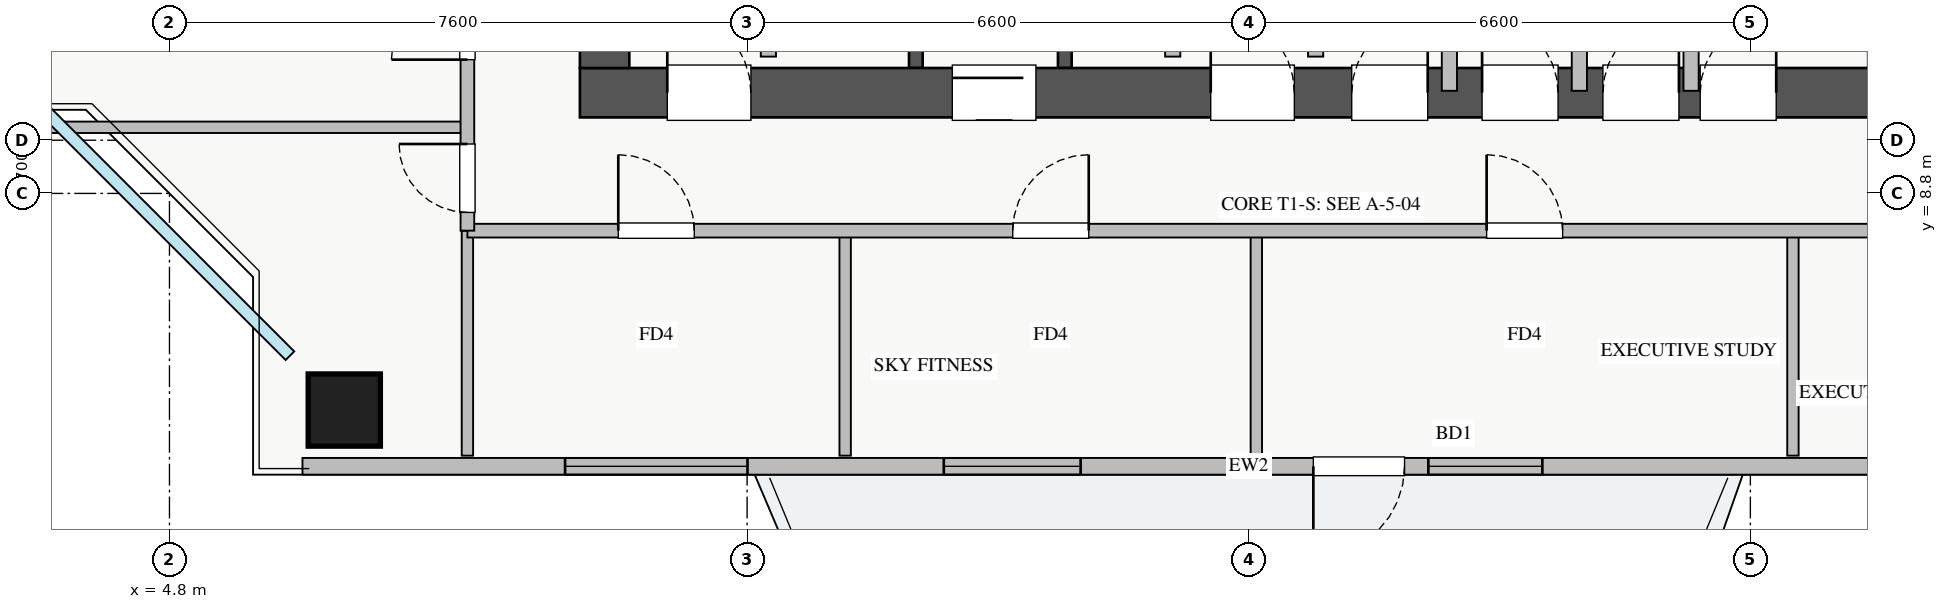
"""IFC4 building model, lengths in metres.
Left out: names, types, materials, properties, quantities, classifications, styles, units other than length and angle.
Written with IfcOpenShell. Run it as: python <this file> out.ifc"""

import sys

from ifc_helpers import new_model, si_unit, direction, frame, frame_2d, origin, origin_2d, place, context, subcontext, project, spatial, rectangle, extrude, source, transform, mapped, element, fill, save


model = new_model("IFC4")
c1 = context("Model", 3, precision=1e-05, world=origin(), true_north=direction((0.0, 1.0)))
c2 = subcontext(c1, "Body", "Model", "MODEL_VIEW")
j1 = project(units=[si_unit("LENGTHUNIT", "METRE"), si_unit("PLANEANGLEUNIT", "RADIAN")], contexts=[c1])
p1 = place(None, origin())
s1 = spatial("IfcSite", under=j1, at=p1, CompositionType="ELEMENT")
p2 = place(p1, origin())
s2 = spatial("IfcBuilding", under=s1, at=p2, CompositionType="ELEMENT")
p3 = place(p2, frame((0.0, 0.0, 182.75)))
s3 = spatial("IfcBuildingStorey", under=s2, at=p3, CompositionType="ELEMENT", Elevation=182.75)
for number, where, z_axis, x_axis in (
    (1, (14.62, 10.45, 0.0), (0.0, 0.0, 1.0), (0.0, 1.0, 0.0)),
    (2, (16.58, 10.45, 0.0), (0.0, 0.0, 1.0), (0.0, 1.0, 0.0)),
):
    element("IfcWall", number, at=place(p3, frame(where, z_axis=z_axis, x_axis=x_axis)), inside=s3, PredefinedType="SHEAR", context=c2, shape_type="SweptSolid", body=[
        extrude(rectangle(XDim=2.35, YDim=0.18, at=frame_2d((1.175, 0.0))), origin(), (0.0, 0.0, 1.0), 3.03),
    ])
p4 = place(p3, frame((10.2, 10.125, 0.0), z_axis=(0.0, 0.0, 1.0), x_axis=(1.0, 0.0, 0.0)))
e3 = element("IfcWall", 3, at=p4, inside=s3, PredefinedType="SHEAR", context=c2, shape_type="SweptSolid", body=[
    extrude(rectangle(XDim=17.6, YDim=0.65, at=frame_2d((8.8, 0.0))), origin(), (0.0, 0.0, 1.0), 3.25),
])
p5 = place(p4, frame((1.15, 0.0, 0.0)))
e4 = element("IfcOpeningElement", 4, at=p5, cuts=e3, PredefinedType="OPENING", context=c2, shape_type="SweptSolid", body=[
    extrude(rectangle(XDim=1.1, YDim=2.05, at=frame_2d((0.55, 1.025))), frame((0.0, 0.335, 0.0), z_axis=(0.0, -1.0, 0.0), x_axis=(1.0, 0.0, 0.0)), (0.0, 0.0, 1.0), 0.67),
])
p6 = place(p4, frame((8.3, 0.0, 0.0)))
e5 = element("IfcOpeningElement", 5, at=p6, cuts=e3, PredefinedType="OPENING", context=c2, shape_type="SweptSolid", body=[
    extrude(rectangle(XDim=1.1, YDim=2.05, at=frame_2d((0.55, 1.025))), frame((0.0, 0.335, 0.0), z_axis=(0.0, -1.0, 0.0), x_axis=(1.0, 0.0, 0.0)), (0.0, 0.0, 1.0), 0.67),
])
p7 = place(p4, frame((4.9, 0.0, 0.0)))
e6 = element("IfcOpeningElement", 6, at=p7, cuts=e3, PredefinedType="OPENING", context=c2, shape_type="SweptSolid", body=[
    extrude(rectangle(XDim=1.1, YDim=2.05, at=frame_2d((0.55, 1.025))), frame((0.0, 0.335, 0.0), z_axis=(0.0, -1.0, 0.0), x_axis=(1.0, 0.0, 0.0)), (0.0, 0.0, 1.0), 0.67),
])
p8 = place(p4, frame((14.74, 0.0, 0.0)))
e7 = element("IfcOpeningElement", 7, at=p8, cuts=e3, PredefinedType="OPENING", context=c2, shape_type="SweptSolid", body=[
    extrude(rectangle(XDim=1.0, YDim=2.05, at=frame_2d((0.5, 1.025))), frame((0.0, 0.335, 0.0), z_axis=(0.0, -1.0, 0.0), x_axis=(1.0, 0.0, 0.0)), (0.0, 0.0, 1.0), 0.67),
])
p9 = place(p4, frame((10.155, 0.0, 0.0)))
e8 = element("IfcOpeningElement", 8, at=p9, cuts=e3, PredefinedType="OPENING", context=c2, shape_type="SweptSolid", body=[
    extrude(rectangle(XDim=1.0, YDim=2.05, at=frame_2d((0.5, 1.025))), frame((0.0, 0.335, 0.0), z_axis=(0.0, -1.0, 0.0), x_axis=(1.0, 0.0, 0.0)), (0.0, 0.0, 1.0), 0.67),
])
p10 = place(p4, frame((11.87, 0.0, 0.0)))
e9 = element("IfcOpeningElement", 9, at=p10, cuts=e3, PredefinedType="OPENING", context=c2, shape_type="SweptSolid", body=[
    extrude(rectangle(XDim=1.0, YDim=2.05, at=frame_2d((0.5, 1.025))), frame((0.0, 0.335, 0.0), z_axis=(0.0, -1.0, 0.0), x_axis=(1.0, 0.0, 0.0)), (0.0, 0.0, 1.0), 0.67),
])
p11 = place(p4, frame((13.46, 0.0, 0.0)))
e10 = element("IfcOpeningElement", 10, at=p11, cuts=e3, PredefinedType="OPENING", context=c2, shape_type="SweptSolid", body=[
    extrude(rectangle(XDim=1.0, YDim=2.05, at=frame_2d((0.5, 1.025))), frame((0.0, 0.335, 0.0), z_axis=(0.0, -1.0, 0.0), x_axis=(1.0, 0.0, 0.0)), (0.0, 0.0, 1.0), 0.67),
])
p12 = place(p3, frame((10.525, 10.45, 0.0), z_axis=(0.0, 0.0, 1.0), x_axis=(0.0, 1.0, 0.0)))
e11 = element("IfcWall", 11, at=p12, inside=s3, PredefinedType="SHEAR", context=c2, shape_type="SweptSolid", body=[
    extrude(rectangle(XDim=5.9, YDim=0.65, at=frame_2d((2.95, 0.0))), origin(), (0.0, 0.0, 1.0), 3.25),
])
m1 = source(origin(), c2, "Body", "SweptSolid", [
    extrude(rectangle(XDim=0.95, YDim=0.95, at=origin_2d()), origin(), (0.0, 0.0, 1.0), 3.25),
])
p13 = place(p3, frame((7.1, 5.95, 0.0), z_axis=(0.0, 0.0, 1.0), x_axis=(1.0, 0.0, 0.0)))
e12 = element("IfcColumn", 12, at=p13, inside=s3, PredefinedType="COLUMN", context=c2, shape_type="MappedRepresentation", body=[
    mapped(m1, transform((0.0, 0.0, 0.0), x_axis=(1.0, 0.0, 0.0), y_axis=(0.0, 1.0, 0.0), z_axis=(0.0, 0.0, 1.0), scale=1.0)),
])
p14 = place(p3, frame((6.55, 5.21, 0.0), z_axis=(0.0, 0.0, 1.0), x_axis=(1.0, 0.0, 0.0)))
e13 = element("IfcWall", 13, at=p14, inside=s3, PredefinedType="STANDARD", context=c2, shape_type="SweptSolid", body=[
    extrude(rectangle(XDim=24.9, YDim=0.22, at=frame_2d((12.45, 0.0))), origin(), (0.0, 0.0, 1.0), 2.57),
])
p15 = place(p14, frame((13.3, 0.0, 0.0)))
e14 = element("IfcOpeningElement", 14, at=p15, cuts=e13, PredefinedType="OPENING", context=c2, shape_type="SweptSolid", body=[
    extrude(rectangle(XDim=1.2, YDim=2.1, at=frame_2d((0.6, 1.05))), frame((0.0, 0.12, 0.0), z_axis=(0.0, -1.0, 0.0), x_axis=(1.0, 0.0, 0.0)), (0.0, 0.0, 1.0), 0.24),
])
p16 = place(p14, frame((3.455, 0.0, 0.9)))
e15 = element("IfcOpeningElement", 15, at=p16, cuts=e13, PredefinedType="OPENING", context=c2, shape_type="SweptSolid", body=[
    extrude(rectangle(XDim=2.4, YDim=1.5, at=frame_2d((1.2, 0.75))), frame((0.0, 0.12, 0.0), z_axis=(0.0, -1.0, 0.0), x_axis=(1.0, 0.0, 0.0)), (0.0, 0.0, 1.0), 0.24),
])
p17 = place(p14, frame((8.438, 0.0, 0.9)))
e16 = element("IfcOpeningElement", 16, at=p17, cuts=e13, PredefinedType="OPENING", context=c2, shape_type="SweptSolid", body=[
    extrude(rectangle(XDim=1.8, YDim=1.45, at=frame_2d((0.9, 0.725))), frame((0.0, 0.12, 0.0), z_axis=(0.0, -1.0, 0.0), x_axis=(1.0, 0.0, 0.0)), (0.0, 0.0, 1.0), 0.24),
])
p18 = place(p14, frame((14.813, 0.0, 0.9)))
e17 = element("IfcOpeningElement", 17, at=p18, cuts=e13, PredefinedType="OPENING", context=c2, shape_type="SweptSolid", body=[
    extrude(rectangle(XDim=1.5, YDim=1.45, at=frame_2d((0.75, 0.725))), frame((0.0, 0.12, 0.0), z_axis=(0.0, -1.0, 0.0), x_axis=(1.0, 0.0, 0.0)), (0.0, 0.0, 1.0), 0.24),
])
p19 = place(p14, frame((20.738, 0.0, 0.9)))
e18 = element("IfcOpeningElement", 18, at=p19, cuts=e13, PredefinedType="OPENING", context=c2, shape_type="SweptSolid", body=[
    extrude(rectangle(XDim=2.1, YDim=1.48, at=frame_2d((1.05, 0.74))), frame((0.0, 0.12, 0.0), z_axis=(0.0, -1.0, 0.0), x_axis=(1.0, 0.0, 0.0)), (0.0, 0.0, 1.0), 0.24),
])
for number, where, z_axis, x_axis in (
    (19, (12.68, 10.6, 0.0), (0.0, 0.0, 1.0), (0.0, 1.0, 0.0)),
    (20, (18.0, 10.6, 0.0), (0.0, 0.0, 1.0), (0.0, 1.0, 0.0)),
    (21, (19.88, 10.6, 0.0), (0.0, 0.0, 1.0), (0.0, 1.0, 0.0)),
):
    element("IfcWall", number, at=place(p3, frame(where, z_axis=z_axis, x_axis=x_axis)), inside=s3, PredefinedType="PARTITIONING", context=c2, shape_type="SweptSolid", body=[
        extrude(rectangle(XDim=2.21, YDim=0.2, at=frame_2d((1.105, 0.0))), origin(), (0.0, 0.0, 1.0), 3.03),
    ])
for number, where, z_axis, x_axis in (
    (22, (24.82, 10.15, 0.0), (0.0, 0.0, 1.0), (0.0, 1.0, 0.0)),
    (23, (21.64, 10.15, 0.0), (0.0, 0.0, 1.0), (0.0, 1.0, 0.0)),
    (24, (23.35, 10.15, 0.0), (0.0, 0.0, 1.0), (0.0, 1.0, 0.0)),
):
    element("IfcWall", number, at=place(p3, frame(where, z_axis=z_axis, x_axis=x_axis)), inside=s3, PredefinedType="PARTITIONING", context=c2, shape_type="SweptSolid", body=[
        extrude(rectangle(XDim=2.65, YDim=0.2, at=frame_2d((1.325, 0.0))), origin(), (0.0, 0.0, 1.0), 3.03),
    ])
p20 = place(p3, frame((13.69, 5.35, 0.0), z_axis=(0.0, 0.0, 1.0), x_axis=(0.0, 1.0, 0.0)))
e25 = element("IfcWall", 25, at=p20, inside=s3, PredefinedType="PARTITIONING", context=c2, shape_type="SweptSolid", body=[
    extrude(rectangle(XDim=2.96, YDim=0.15, at=frame_2d((1.48, 0.0))), origin(), (0.0, 0.0, 1.0), 3.03),
])
p21 = place(p3, frame((19.1, 5.35, 0.0), z_axis=(0.0, 0.0, 1.0), x_axis=(0.0, 1.0, 0.0)))
e26 = element("IfcWall", 26, at=p21, inside=s3, PredefinedType="PARTITIONING", context=c2, shape_type="SweptSolid", body=[
    extrude(rectangle(XDim=2.96, YDim=0.15, at=frame_2d((1.48, 0.0))), origin(), (0.0, 0.0, 1.0), 2.825),
])
for number, where, z_axis, x_axis in (
    (27, (26.16, 5.35, 0.0), (0.0, 0.0, 1.0), (0.0, 1.0, 0.0)),
    (28, (8.72, 5.35, 0.0), (0.0, 0.0, 1.0), (0.0, 1.0, 0.0)),
):
    element("IfcWall", number, at=place(p3, frame(where, z_axis=z_axis, x_axis=x_axis)), inside=s3, PredefinedType="PARTITIONING", context=c2, shape_type="SweptSolid", body=[
        extrude(rectangle(XDim=2.96, YDim=0.15, at=frame_2d((1.48, 0.0))), origin(), (0.0, 0.0, 1.0), 3.03),
    ])
p22 = place(p3, frame((8.72, 8.31, 0.0), z_axis=(0.0, 0.0, 1.0), x_axis=(1.0, 0.0, 0.0)))
e29 = element("IfcWall", 29, at=p22, inside=s3, PredefinedType="PARTITIONING", context=c2, shape_type="SweptSolid", body=[
    extrude(rectangle(XDim=23.63, YDim=0.18, at=frame_2d((11.815, 0.0))), origin(), (0.0, 0.0, 1.0), 3.03),
])
p23 = place(p22, frame((1.985, 0.0, 0.0)))
e30 = element("IfcOpeningElement", 30, at=p23, cuts=e29, PredefinedType="OPENING", context=c2, shape_type="SweptSolid", body=[
    extrude(rectangle(XDim=1.0, YDim=2.05, at=frame_2d((0.5, 1.025))), frame((0.0, 0.1, 0.0), z_axis=(0.0, -1.0, 0.0), x_axis=(1.0, 0.0, 0.0)), (0.0, 0.0, 1.0), 0.2),
])
p24 = place(p22, frame((7.175, 0.0, 0.0)))
e31 = element("IfcOpeningElement", 31, at=p24, cuts=e29, PredefinedType="OPENING", context=c2, shape_type="SweptSolid", body=[
    extrude(rectangle(XDim=1.0, YDim=2.05, at=frame_2d((0.5, 1.025))), frame((0.0, 0.1, 0.0), z_axis=(0.0, -1.0, 0.0), x_axis=(1.0, 0.0, 0.0)), (0.0, 0.0, 1.0), 0.2),
])
p25 = place(p22, frame((13.41, 0.0, 0.0)))
e32 = element("IfcOpeningElement", 32, at=p25, cuts=e29, PredefinedType="OPENING", context=c2, shape_type="SweptSolid", body=[
    extrude(rectangle(XDim=1.0, YDim=2.05, at=frame_2d((0.5, 1.025))), frame((0.0, 0.1, 0.0), z_axis=(0.0, -1.0, 0.0), x_axis=(1.0, 0.0, 0.0)), (0.0, 0.0, 1.0), 0.2),
])
p26 = place(p22, frame((19.85, 0.0, 0.0)))
e33 = element("IfcOpeningElement", 33, at=p26, cuts=e29, PredefinedType="OPENING", context=c2, shape_type="SweptSolid", body=[
    extrude(rectangle(XDim=1.0, YDim=2.05, at=frame_2d((0.5, 1.025))), frame((0.0, 0.1, 0.0), z_axis=(0.0, -1.0, 0.0), x_axis=(1.0, 0.0, 0.0)), (0.0, 0.0, 1.0), 0.2),
])
p27 = place(p3, frame((1.35, 9.67, 0.0), z_axis=(0.0, 0.0, 1.0), x_axis=(1.0, 0.0, 0.0)))
e34 = element("IfcWall", 34, at=p27, inside=s3, PredefinedType="PARTITIONING", context=c2, shape_type="SweptSolid", body=[
    extrude(rectangle(XDim=7.37, YDim=0.15, at=frame_2d((3.685, 0.0))), origin(), (0.0, 0.0, 1.0), 3.03),
])
p28 = place(p3, frame((8.72, 8.31, 0.0), z_axis=(0.0, 0.0, 1.0), x_axis=(0.0, 1.0, 0.0)))
e35 = element("IfcWall", 35, at=p28, inside=s3, PredefinedType="PARTITIONING", context=c2, shape_type="SweptSolid", body=[
    extrude(rectangle(XDim=29.37, YDim=0.18, at=frame_2d((14.685, 0.0))), origin(), (0.0, 0.0, 1.0), 3.03),
])
p29 = place(p28, frame((28.06, 0.0, 0.0)))
e36 = element("IfcOpeningElement", 36, at=p29, cuts=e35, PredefinedType="OPENING", context=c2, shape_type="SweptSolid", body=[
    extrude(rectangle(XDim=0.9, YDim=2.05, at=frame_2d((0.45, 1.025))), frame((0.0, 0.1, 0.0), z_axis=(0.0, -1.0, 0.0), x_axis=(1.0, 0.0, 0.0)), (0.0, 0.0, 1.0), 0.2),
])
p30 = place(p28, frame((0.24, 0.0, 0.0)))
e37 = element("IfcOpeningElement", 37, at=p30, cuts=e35, PredefinedType="OPENING", context=c2, shape_type="SweptSolid", body=[
    extrude(rectangle(XDim=0.9, YDim=2.05, at=frame_2d((0.45, 1.025))), frame((0.0, 0.1, 0.0), z_axis=(0.0, -1.0, 0.0), x_axis=(1.0, 0.0, 0.0)), (0.0, 0.0, 1.0), 0.2),
])
p31 = place(p28, frame((2.25, 0.0, 0.0)))
e38 = element("IfcOpeningElement", 38, at=p31, cuts=e35, PredefinedType="OPENING", context=c2, shape_type="SweptSolid", body=[
    extrude(rectangle(XDim=1.0, YDim=2.05, at=frame_2d((0.5, 1.025))), frame((0.0, 0.1, 0.0), z_axis=(0.0, -1.0, 0.0), x_axis=(1.0, 0.0, 0.0)), (0.0, 0.0, 1.0), 0.2),
])
p32 = place(p28, frame((7.935, 0.0, 0.0)))
e39 = element("IfcOpeningElement", 39, at=p32, cuts=e35, PredefinedType="OPENING", context=c2, shape_type="SweptSolid", body=[
    extrude(rectangle(XDim=1.0, YDim=2.05, at=frame_2d((0.5, 1.025))), frame((0.0, 0.1, 0.0), z_axis=(0.0, -1.0, 0.0), x_axis=(1.0, 0.0, 0.0)), (0.0, 0.0, 1.0), 0.2),
])
p33 = place(p28, frame((17.3, 0.0, 0.0)))
e40 = element("IfcOpeningElement", 40, at=p33, cuts=e35, PredefinedType="OPENING", context=c2, shape_type="SweptSolid", body=[
    extrude(rectangle(XDim=1.0, YDim=2.05, at=frame_2d((0.5, 1.025))), frame((0.0, 0.1, 0.0), z_axis=(0.0, -1.0, 0.0), x_axis=(1.0, 0.0, 0.0)), (0.0, 0.0, 1.0), 0.2),
])
p34 = place(p28, frame((21.98, 0.0, 0.0)))
e41 = element("IfcOpeningElement", 41, at=p34, cuts=e35, PredefinedType="OPENING", context=c2, shape_type="SweptSolid", body=[
    extrude(rectangle(XDim=1.0, YDim=2.05, at=frame_2d((0.5, 1.025))), frame((0.0, 0.1, 0.0), z_axis=(0.0, -1.0, 0.0), x_axis=(1.0, 0.0, 0.0)), (0.0, 0.0, 1.0), 0.2),
])
m2 = source(origin(), c2, "Body", "SweptSolid", [
    extrude(rectangle(XDim=1.2, YDim=2.1, at=frame_2d((0.6, 1.05))), frame((0.0, 0.025, 0.0), z_axis=(0.0, -1.0, 0.0), x_axis=(1.0, 0.0, 0.0)), (0.0, 0.0, 1.0), 0.05),
])
p35 = place(p15, frame((1.2, 0.0, 0.0), z_axis=(0.0, 0.0, 1.0), x_axis=(-1.0, 0.0, 0.0)))
e42 = element("IfcDoor", 42, at=p35, inside=s3, OperationType="SINGLE_SWING_LEFT", PredefinedType="DOOR", context=c2, shape_type="MappedRepresentation", body=[
    mapped(m2, transform((0.0, 0.0, 0.0), x_axis=(1.0, 0.0, 0.0), y_axis=(0.0, 1.0, 0.0), z_axis=(0.0, 0.0, 1.0), scale=1.0)),
])
fill(e14, e42)
m3 = source(origin(), c2, "Body", "SweptSolid", [
    extrude(rectangle(XDim=2.4, YDim=1.5, at=frame_2d((1.2, 0.75))), frame((0.0, 0.03, 0.0), z_axis=(0.0, -1.0, 0.0), x_axis=(1.0, 0.0, 0.0)), (0.0, 0.0, 1.0), 0.06),
])
p36 = place(p16, origin())
e43 = element("IfcWindow", 43, at=p36, inside=s3, PartitioningType="TRIPLE_PANEL_VERTICAL", PredefinedType="WINDOW", context=c2, shape_type="MappedRepresentation", body=[
    mapped(m3, transform((0.0, 0.0, 0.0), x_axis=(1.0, 0.0, 0.0), y_axis=(0.0, 1.0, 0.0), z_axis=(0.0, 0.0, 1.0), scale=1.0)),
])
fill(e15, e43)
m4 = source(origin(), c2, "Body", "SweptSolid", [
    extrude(rectangle(XDim=1.8, YDim=1.45, at=frame_2d((0.9, 0.725))), frame((0.0, 0.03, 0.0), z_axis=(0.0, -1.0, 0.0), x_axis=(1.0, 0.0, 0.0)), (0.0, 0.0, 1.0), 0.06),
])
p37 = place(p17, origin())
e44 = element("IfcWindow", 44, at=p37, inside=s3, PartitioningType="DOUBLE_PANEL_VERTICAL", PredefinedType="WINDOW", context=c2, shape_type="MappedRepresentation", body=[
    mapped(m4, transform((0.0, 0.0, 0.0), x_axis=(1.0, 0.0, 0.0), y_axis=(0.0, 1.0, 0.0), z_axis=(0.0, 0.0, 1.0), scale=1.0)),
])
fill(e16, e44)
m5 = source(origin(), c2, "Body", "SweptSolid", [
    extrude(rectangle(XDim=1.5, YDim=1.45, at=frame_2d((0.75, 0.725))), frame((0.0, 0.03, 0.0), z_axis=(0.0, -1.0, 0.0), x_axis=(1.0, 0.0, 0.0)), (0.0, 0.0, 1.0), 0.06),
])
p38 = place(p18, origin())
e45 = element("IfcWindow", 45, at=p38, inside=s3, PartitioningType="DOUBLE_PANEL_VERTICAL", PredefinedType="WINDOW", context=c2, shape_type="MappedRepresentation", body=[
    mapped(m5, transform((0.0, 0.0, 0.0), x_axis=(1.0, 0.0, 0.0), y_axis=(0.0, 1.0, 0.0), z_axis=(0.0, 0.0, 1.0), scale=1.0)),
])
fill(e17, e45)
m6 = source(origin(), c2, "Body", "SweptSolid", [
    extrude(rectangle(XDim=1.1, YDim=2.05, at=frame_2d((0.55, 1.025))), frame((0.0, 0.025, 0.0), z_axis=(0.0, -1.0, 0.0), x_axis=(1.0, 0.0, 0.0)), (0.0, 0.0, 1.0), 0.05),
])
p39 = place(p5, origin())
e46 = element("IfcDoor", 46, at=p39, inside=s3, OperationType="SINGLE_SWING_LEFT", PredefinedType="DOOR", context=c2, shape_type="MappedRepresentation", body=[
    mapped(m6, transform((0.0, 0.0, 0.0), x_axis=(1.0, 0.0, 0.0), y_axis=(0.0, 1.0, 0.0), z_axis=(0.0, 0.0, 1.0), scale=1.0)),
])
fill(e4, e46)
p40 = place(p6, origin())
e47 = element("IfcDoor", 47, at=p40, inside=s3, OperationType="SINGLE_SWING_LEFT", PredefinedType="DOOR", context=c2, shape_type="MappedRepresentation", body=[
    mapped(m6, transform((0.0, 0.0, 0.0), x_axis=(1.0, 0.0, 0.0), y_axis=(0.0, 1.0, 0.0), z_axis=(0.0, 0.0, 1.0), scale=1.0)),
])
fill(e5, e47)
p41 = place(p7, origin())
e48 = element("IfcDoor", 48, at=p41, inside=s3, OperationType="SLIDING_TO_RIGHT", PredefinedType="DOOR", context=c2, shape_type="MappedRepresentation", body=[
    mapped(m6, transform((0.0, 0.0, 0.0), x_axis=(1.0, 0.0, 0.0), y_axis=(0.0, 1.0, 0.0), z_axis=(0.0, 0.0, 1.0), scale=1.0)),
])
fill(e6, e48)
m7 = source(origin(), c2, "Body", "SweptSolid", [
    extrude(rectangle(XDim=1.0, YDim=2.05, at=frame_2d((0.5, 1.025))), frame((0.0, 0.025, 0.0), z_axis=(0.0, -1.0, 0.0), x_axis=(1.0, 0.0, 0.0)), (0.0, 0.0, 1.0), 0.05),
])
p42 = place(p8, origin())
e49 = element("IfcDoor", 49, at=p42, inside=s3, OperationType="SINGLE_SWING_RIGHT", PredefinedType="DOOR", context=c2, shape_type="MappedRepresentation", body=[
    mapped(m7, transform((0.0, 0.0, 0.0), x_axis=(1.0, 0.0, 0.0), y_axis=(0.0, 1.0, 0.0), z_axis=(0.0, 0.0, 1.0), scale=1.0)),
])
fill(e7, e49)
p43 = place(p9, origin())
e50 = element("IfcDoor", 50, at=p43, inside=s3, OperationType="SINGLE_SWING_RIGHT", PredefinedType="DOOR", context=c2, shape_type="MappedRepresentation", body=[
    mapped(m7, transform((0.0, 0.0, 0.0), x_axis=(1.0, 0.0, 0.0), y_axis=(0.0, 1.0, 0.0), z_axis=(0.0, 0.0, 1.0), scale=1.0)),
])
fill(e8, e50)
p44 = place(p10, origin())
e51 = element("IfcDoor", 51, at=p44, inside=s3, OperationType="SINGLE_SWING_LEFT", PredefinedType="DOOR", context=c2, shape_type="MappedRepresentation", body=[
    mapped(m7, transform((0.0, 0.0, 0.0), x_axis=(1.0, 0.0, 0.0), y_axis=(0.0, 1.0, 0.0), z_axis=(0.0, 0.0, 1.0), scale=1.0)),
])
fill(e9, e51)
p45 = place(p11, origin())
e52 = element("IfcDoor", 52, at=p45, inside=s3, OperationType="SINGLE_SWING_RIGHT", PredefinedType="DOOR", context=c2, shape_type="MappedRepresentation", body=[
    mapped(m7, transform((0.0, 0.0, 0.0), x_axis=(1.0, 0.0, 0.0), y_axis=(0.0, 1.0, 0.0), z_axis=(0.0, 0.0, 1.0), scale=1.0)),
])
fill(e10, e52)
p46 = place(p23, origin())
e53 = element("IfcDoor", 53, at=p46, inside=s3, OperationType="SINGLE_SWING_LEFT", PredefinedType="DOOR", context=c2, shape_type="MappedRepresentation", body=[
    mapped(m7, transform((0.0, 0.0, 0.0), x_axis=(1.0, 0.0, 0.0), y_axis=(0.0, 1.0, 0.0), z_axis=(0.0, 0.0, 1.0), scale=1.0)),
])
fill(e30, e53)
p47 = place(p24, origin())
e54 = element("IfcDoor", 54, at=p47, inside=s3, OperationType="SINGLE_SWING_RIGHT", PredefinedType="DOOR", context=c2, shape_type="MappedRepresentation", body=[
    mapped(m7, transform((0.0, 0.0, 0.0), x_axis=(1.0, 0.0, 0.0), y_axis=(0.0, 1.0, 0.0), z_axis=(0.0, 0.0, 1.0), scale=1.0)),
])
fill(e31, e54)
p48 = place(p25, origin())
e55 = element("IfcDoor", 55, at=p48, inside=s3, OperationType="SINGLE_SWING_LEFT", PredefinedType="DOOR", context=c2, shape_type="MappedRepresentation", body=[
    mapped(m7, transform((0.0, 0.0, 0.0), x_axis=(1.0, 0.0, 0.0), y_axis=(0.0, 1.0, 0.0), z_axis=(0.0, 0.0, 1.0), scale=1.0)),
])
fill(e32, e55)
m8 = source(origin(), c2, "Body", "SweptSolid", [
    extrude(rectangle(XDim=0.9, YDim=2.05, at=frame_2d((0.45, 1.025))), frame((0.0, 0.025, 0.0), z_axis=(0.0, -1.0, 0.0), x_axis=(1.0, 0.0, 0.0)), (0.0, 0.0, 1.0), 0.05),
])
p49 = place(p30, origin())
e56 = element("IfcDoor", 56, at=p49, inside=s3, OperationType="SINGLE_SWING_RIGHT", PredefinedType="DOOR", context=c2, shape_type="MappedRepresentation", body=[
    mapped(m8, transform((0.0, 0.0, 0.0), x_axis=(1.0, 0.0, 0.0), y_axis=(0.0, 1.0, 0.0), z_axis=(0.0, 0.0, 1.0), scale=1.0)),
])
fill(e37, e56)
p50 = place(p31, origin())
e57 = element("IfcDoor", 57, at=p50, inside=s3, OperationType="SINGLE_SWING_LEFT", PredefinedType="DOOR", context=c2, shape_type="MappedRepresentation", body=[
    mapped(m7, transform((0.0, 0.0, 0.0), x_axis=(1.0, 0.0, 0.0), y_axis=(0.0, 1.0, 0.0), z_axis=(0.0, 0.0, 1.0), scale=1.0)),
])
fill(e38, e57)
save(model, sys.argv[1])
